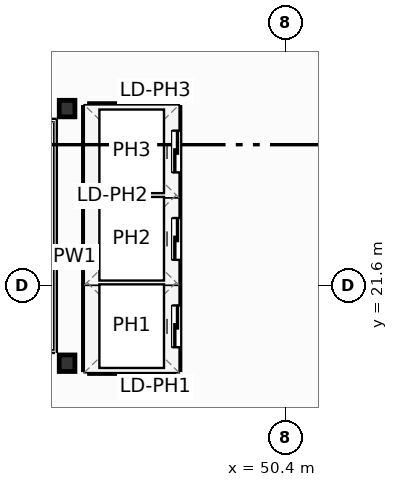
"""IFC4 building model, lengths in metres.
Left out: names, types, materials, properties, quantities, classifications, styles, units other than length and angle.
Written with IfcOpenShell. Run it as: python <this file> out.ifc"""

import sys

from ifc_helpers import new_model, si_unit, direction, frame, frame_2d, origin, origin_2d, place, context, subcontext, project, spatial, rectangle, i_section, extrude, element, fill, save


model = new_model("IFC4")
c1 = context("Model", 3, precision=1e-05, world=origin(), true_north=direction((0.0, 1.0)))
c2 = subcontext(c1, "Body", "Model", "MODEL_VIEW")
j1 = project(units=[si_unit("LENGTHUNIT", "METRE"), si_unit("PLANEANGLEUNIT", "RADIAN")], contexts=[c1])
p1 = place(None, origin())
s1 = spatial("IfcSite", under=j1, at=p1, CompositionType="ELEMENT")
p2 = place(p1, origin())
s2 = spatial("IfcBuilding", under=s1, at=p2, CompositionType="ELEMENT")
p3 = place(p2, frame((0.0, 0.0, 227.5)))
s3 = spatial("IfcBuildingStorey", under=s2, at=p3, CompositionType="ELEMENT", Elevation=227.5)
for number, where, z_axis, x_axis in (
    (1, (44.65, 19.55, 0.0), (0.0, 0.0, 1.0), (1.0, 0.0, 0.0)),
    (2, (44.65, 26.25, 0.0), (0.0, 0.0, 1.0), (1.0, 0.0, 0.0)),
):
    element("IfcColumn", number, at=place(p3, frame(where, z_axis=z_axis, x_axis=x_axis)), inside=s3, PredefinedType="COLUMN", context=c2, shape_type="SweptSolid", body=[
        extrude(i_section(OverallWidth=0.412, OverallDepth=0.435, WebThickness=0.036, FlangeThickness=0.057, FilletRadius=0.025, at=origin_2d()), origin(), (0.0, 0.0, 1.0), 3.7),
    ])
for number, where, z_axis, x_axis in (
    (3, (45.24, 21.675, 0.0), (0.0, 0.0, 1.0), (1.0, 0.0, 0.0)),
    (4, (45.24, 23.975, 0.0), (0.0, 0.0, 1.0), (1.0, 0.0, 0.0)),
):
    element("IfcWall", number, at=place(p3, frame(where, z_axis=z_axis, x_axis=x_axis)), inside=s3, PredefinedType="PARTITIONING", context=c2, shape_type="SweptSolid", body=[
        extrude(rectangle(XDim=2.22, YDim=0.2, at=frame_2d((1.11, 0.0))), origin(), (0.0, 0.0, 1.0), 3.45),
    ])
p4 = place(p3, frame((45.24, 19.38, 0.0), z_axis=(0.0, 0.0, 1.0), x_axis=(1.0, 0.0, 0.0)))
e5 = element("IfcWall", 5, at=p4, inside=s3, PredefinedType="PARTITIONING", context=c2, shape_type="SweptSolid", body=[
    extrude(rectangle(XDim=2.22, YDim=0.2, at=frame_2d((1.11, 0.0))), origin(), (0.0, 0.0, 1.0), 2.662),
])
p5 = place(p3, frame((45.24, 26.28, 0.0), z_axis=(0.0, 0.0, 1.0), x_axis=(1.0, 0.0, 0.0)))
e6 = element("IfcWall", 6, at=p5, inside=s3, PredefinedType="PARTITIONING", context=c2, shape_type="SweptSolid", body=[
    extrude(rectangle(XDim=2.22, YDim=0.2, at=frame_2d((1.11, 0.0))), origin(), (0.0, 0.0, 1.0), 3.45),
])
p6 = place(p3, frame((45.18, 19.38, 0.0), z_axis=(0.0, 0.0, 1.0), x_axis=(0.0, 1.0, 0.0)))
e7 = element("IfcWall", 7, at=p6, inside=s3, PredefinedType="PARTITIONING", context=c2, shape_type="SweptSolid", body=[
    extrude(rectangle(XDim=6.9, YDim=0.2, at=frame_2d((3.45, 0.0))), origin(), (0.0, 0.0, 1.0), 3.45),
])
p7 = place(p3, frame((47.52, 19.38, 0.0), z_axis=(0.0, 0.0, 1.0), x_axis=(0.0, 1.0, 0.0)))
e8 = element("IfcWall", 8, at=p7, inside=s3, PredefinedType="PARTITIONING", context=c2, shape_type="SweptSolid", body=[
    extrude(rectangle(XDim=6.9, YDim=0.2, at=frame_2d((3.45, 0.0))), origin(), (0.0, 0.0, 1.0), 3.45),
])
p8 = place(p7, frame((0.59, 0.0, 0.0)))
e9 = element("IfcOpeningElement", 9, at=p8, cuts=e8, PredefinedType="OPENING", context=c2, shape_type="SweptSolid", body=[
    extrude(rectangle(XDim=1.1, YDim=2.15, at=frame_2d((0.55, 1.075))), frame((0.0, 0.11, 0.0), z_axis=(0.0, -1.0, 0.0), x_axis=(1.0, 0.0, 0.0)), (0.0, 0.0, 1.0), 0.22),
])
p9 = place(p7, frame((2.89, 0.0, 0.0)))
e10 = element("IfcOpeningElement", 10, at=p9, cuts=e8, PredefinedType="OPENING", context=c2, shape_type="SweptSolid", body=[
    extrude(rectangle(XDim=1.1, YDim=2.15, at=frame_2d((0.55, 1.075))), frame((0.0, 0.11, 0.0), z_axis=(0.0, -1.0, 0.0), x_axis=(1.0, 0.0, 0.0)), (0.0, 0.0, 1.0), 0.22),
])
p10 = place(p7, frame((5.19, 0.0, 0.0)))
e11 = element("IfcOpeningElement", 11, at=p10, cuts=e8, PredefinedType="OPENING", context=c2, shape_type="SweptSolid", body=[
    extrude(rectangle(XDim=1.1, YDim=2.15, at=frame_2d((0.55, 1.075))), frame((0.0, 0.11, 0.0), z_axis=(0.0, -1.0, 0.0), x_axis=(1.0, 0.0, 0.0)), (0.0, 0.0, 1.0), 0.22),
])
p11 = place(p8, origin())
e12 = element("IfcDoor", 12, at=p11, inside=s3, OperationType="SLIDING_TO_LEFT", PredefinedType="DOOR", context=c2, shape_type="SweptSolid", body=[
    extrude(rectangle(XDim=1.1, YDim=2.15, at=frame_2d((0.55, 1.075))), frame((0.0, 0.025, 0.0), z_axis=(0.0, -1.0, 0.0), x_axis=(1.0, 0.0, 0.0)), (0.0, 0.0, 1.0), 0.05),
])
fill(e9, e12)
p12 = place(p9, origin())
e13 = element("IfcDoor", 13, at=p12, inside=s3, OperationType="SLIDING_TO_LEFT", PredefinedType="DOOR", context=c2, shape_type="SweptSolid", body=[
    extrude(rectangle(XDim=1.1, YDim=2.15, at=frame_2d((0.55, 1.075))), frame((0.0, 0.025, 0.0), z_axis=(0.0, -1.0, 0.0), x_axis=(1.0, 0.0, 0.0)), (0.0, 0.0, 1.0), 0.05),
])
fill(e10, e13)
p13 = place(p10, origin())
e14 = element("IfcDoor", 14, at=p13, inside=s3, OperationType="SLIDING_TO_LEFT", PredefinedType="DOOR", context=c2, shape_type="SweptSolid", body=[
    extrude(rectangle(XDim=1.1, YDim=2.15, at=frame_2d((0.55, 1.075))), frame((0.0, 0.025, 0.0), z_axis=(0.0, -1.0, 0.0), x_axis=(1.0, 0.0, 0.0)), (0.0, 0.0, 1.0), 0.05),
])
fill(e11, e14)
save(model, sys.argv[1])
